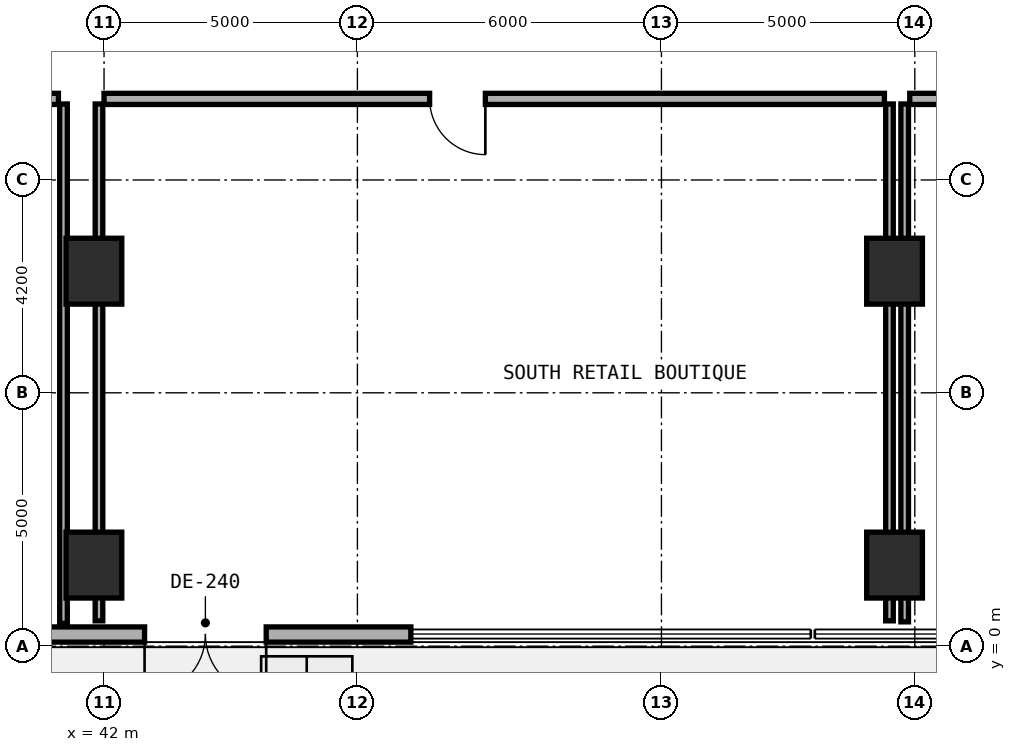
"""IFC4 building model, lengths in metres.
Left out: names, types, materials, properties, quantities, classifications, styles, units other than length and angle.
Written with IfcOpenShell. Run it as: python <this file> out.ifc"""

import sys

from ifc_helpers import new_model, si_unit, direction, frame, frame_2d, origin, origin_2d, place, context, subcontext, project, spatial, rectangle, extrude, element, fill, save


model = new_model("IFC4")
c1 = context("Model", 3, precision=1e-05, world=origin(), true_north=direction((0.0, 1.0)))
c2 = subcontext(c1, "Body", "Model", "MODEL_VIEW")
j1 = project(units=[si_unit("LENGTHUNIT", "METRE"), si_unit("PLANEANGLEUNIT", "RADIAN")], contexts=[c1])
p1 = place(None, origin())
s1 = spatial("IfcSite", under=j1, at=p1, CompositionType="ELEMENT")
p2 = place(p1, origin())
s2 = spatial("IfcBuilding", under=s1, at=p2, CompositionType="ELEMENT")
p3 = place(p2, origin())
s3 = spatial("IfcBuildingStorey", under=s2, at=p3, CompositionType="ELEMENT", Elevation=0.0)
for number, where, z_axis, x_axis in (
    (1, (41.8, 1.6, 0.0), (0.0, 0.0, 1.0), (1.0, 0.0, 0.0)),
    (2, (57.6, 1.6, 0.0), (0.0, 0.0, 1.0), (1.0, 0.0, 0.0)),
    (3, (41.8, 7.4, 0.0), (0.0, 0.0, 1.0), (1.0, 0.0, 0.0)),
    (4, (57.6, 7.4, 0.0), (0.0, 0.0, 1.0), (1.0, 0.0, 0.0)),
):
    element("IfcColumn", number, at=place(p3, frame(where, z_axis=z_axis, x_axis=x_axis)), inside=s3, PredefinedType="COLUMN", context=c2, shape_type="SweptSolid", body=[
        extrude(rectangle(XDim=1.1, YDim=1.3, at=origin_2d()), origin(), (0.0, 0.0, 1.0), 5.4),
    ])
p4 = place(p3, frame((39.958, 0.23, 0.0), z_axis=(0.0, 0.0, 1.0), x_axis=(1.0, 0.0, 0.0)))
e5 = element("IfcWall", 5, at=p4, inside=s3, PredefinedType="STANDARD", context=c2, shape_type="SweptSolid", body=[
    extrude(rectangle(XDim=8.097, YDim=0.3, at=frame_2d((4.048, 0.0))), origin(), (0.0, 0.0, 1.0), 5.05),
])
p5 = place(p4, frame((2.842, 0.0, 0.0)))
e6 = element("IfcOpeningElement", 6, at=p5, cuts=e5, PredefinedType="OPENING", context=c2, shape_type="SweptSolid", body=[
    extrude(rectangle(XDim=2.4, YDim=2.6, at=frame_2d((1.2, 1.3))), frame((0.0, 0.16, 0.0), z_axis=(0.0, -1.0, 0.0), x_axis=(1.0, 0.0, 0.0)), (0.0, 0.0, 1.0), 0.32),
])
p6 = place(p3, frame((41.2, 0.45, 0.0), z_axis=(0.0, 0.0, 1.0), x_axis=(0.0, 1.0, 0.0)))
e7 = element("IfcWall", 7, at=p6, inside=s3, PredefinedType="PARTITIONING", context=c2, shape_type="SweptSolid", body=[
    extrude(rectangle(XDim=10.25, YDim=0.15, at=frame_2d((5.125, 0.0))), origin(), (0.0, 0.0, 1.0), 4.225),
])
p7 = place(p3, frame((26.3, 10.8, 0.0), z_axis=(0.0, 0.0, 1.0), x_axis=(1.0, 0.0, 0.0)))
e8 = element("IfcWall", 8, at=p7, inside=s3, PredefinedType="SOLIDWALL", context=c2, shape_type="SweptSolid", body=[
    extrude(rectangle(XDim=14.8, YDim=0.22, at=frame_2d((7.4, 0.0))), origin(), (0.0, 0.0, 1.0), 4.125),
])
p8 = place(p7, frame((5.875, 0.0, 0.0)))
e9 = element("IfcOpeningElement", 9, at=p8, cuts=e8, PredefinedType="OPENING", context=c2, shape_type="SweptSolid", body=[
    extrude(rectangle(XDim=1.1, YDim=2.1, at=frame_2d((0.55, 1.05))), frame((0.0, 0.12, 0.0), z_axis=(0.0, -1.0, 0.0), x_axis=(1.0, 0.0, 0.0)), (0.0, 0.0, 1.0), 0.24),
])
for number, where, z_axis, x_axis in (
    (10, (41.9, 0.5, 0.0), (0.0, 0.0, 1.0), (0.0, 1.0, 0.0)),
    (11, (57.5, 0.5, 0.0), (0.0, 0.0, 1.0), (0.0, 1.0, 0.0)),
):
    element("IfcWall", number, at=place(p3, frame(where, z_axis=z_axis, x_axis=x_axis)), inside=s3, PredefinedType="PARTITIONING", context=c2, shape_type="SweptSolid", body=[
        extrude(rectangle(XDim=10.2, YDim=0.15, at=frame_2d((5.1, 0.0))), origin(), (0.0, 0.0, 1.0), 4.225),
    ])
p9 = place(p3, frame((42.0, 10.8, 0.0), z_axis=(0.0, 0.0, 1.0), x_axis=(1.0, 0.0, 0.0)))
e12 = element("IfcWall", 12, at=p9, inside=s3, PredefinedType="SOLIDWALL", context=c2, shape_type="SweptSolid", body=[
    extrude(rectangle(XDim=15.4, YDim=0.22, at=frame_2d((7.7, 0.0))), origin(), (0.0, 0.0, 1.0), 5.05),
])
p10 = place(p9, frame((6.425, 0.0, 0.0)))
e13 = element("IfcOpeningElement", 13, at=p10, cuts=e12, PredefinedType="OPENING", context=c2, shape_type="SweptSolid", body=[
    extrude(rectangle(XDim=1.1, YDim=2.1, at=frame_2d((0.55, 1.05))), frame((0.0, 0.12, 0.0), z_axis=(0.0, -1.0, 0.0), x_axis=(1.0, 0.0, 0.0)), (0.0, 0.0, 1.0), 0.24),
])
p11 = place(p3, frame((57.8, 0.48, 0.0), z_axis=(0.0, 0.0, 1.0), x_axis=(0.0, 1.0, 0.0)))
e14 = element("IfcWall", 14, at=p11, inside=s3, PredefinedType="PARTITIONING", context=c2, shape_type="SweptSolid", body=[
    extrude(rectangle(XDim=10.22, YDim=0.15, at=frame_2d((5.11, 0.0))), origin(), (0.0, 0.0, 1.0), 4.225),
])
p12 = place(p3, frame((57.9, 10.8, 0.0), z_axis=(0.0, 0.0, 1.0), x_axis=(1.0, 0.0, 0.0)))
e15 = element("IfcWall", 15, at=p12, inside=s3, PredefinedType="SOLIDWALL", context=c2, shape_type="SweptSolid", body=[
    extrude(rectangle(XDim=7.55, YDim=0.22, at=frame_2d((3.775, 0.0))), origin(), (0.0, 0.0, 1.0), 4.665),
])
p13 = place(p12, frame((2.893, 0.0, 0.0)))
e16 = element("IfcOpeningElement", 16, at=p13, cuts=e15, PredefinedType="OPENING", context=c2, shape_type="SweptSolid", body=[
    extrude(rectangle(XDim=1.1, YDim=2.1, at=frame_2d((0.55, 1.05))), frame((0.0, 0.12, 0.0), z_axis=(0.0, -1.0, 0.0), x_axis=(1.0, 0.0, 0.0)), (0.0, 0.0, 1.0), 0.24),
])
p14 = place(p5, frame((2.4, 0.0, 0.0), z_axis=(0.0, 0.0, 1.0), x_axis=(-1.0, 0.0, 0.0)))
e17 = element("IfcDoor", 17, at=p14, inside=s3, OperationType="DOUBLE_DOOR_SINGLE_SWING", PredefinedType="DOOR", context=c2, shape_type="SweptSolid", body=[
    extrude(rectangle(XDim=2.4, YDim=2.6, at=frame_2d((1.2, 1.3))), frame((0.0, 0.025, 0.0), z_axis=(0.0, -1.0, 0.0), x_axis=(1.0, 0.0, 0.0)), (0.0, 0.0, 1.0), 0.05),
])
fill(e6, e17)
p15 = place(p10, frame((1.1, 0.0, 0.0), z_axis=(0.0, 0.0, 1.0), x_axis=(-1.0, 0.0, 0.0)))
e18 = element("IfcDoor", 18, at=p15, inside=s3, OperationType="SINGLE_SWING_LEFT", PredefinedType="DOOR", context=c2, shape_type="SweptSolid", body=[
    extrude(rectangle(XDim=1.1, YDim=2.1, at=frame_2d((0.55, 1.05))), frame((0.0, 0.025, 0.0), z_axis=(0.0, -1.0, 0.0), x_axis=(1.0, 0.0, 0.0)), (0.0, 0.0, 1.0), 0.05),
])
fill(e13, e18)
save(model, sys.argv[1])
